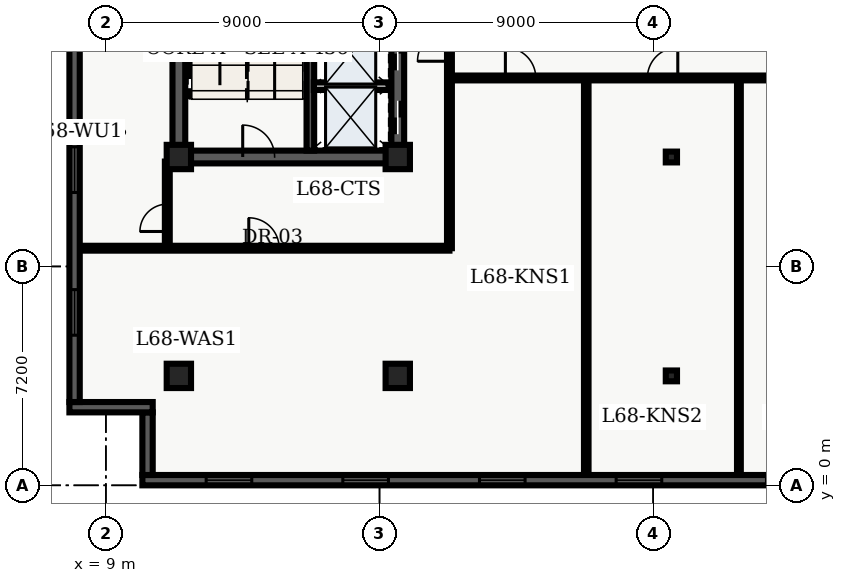
"""IFC4 building model, lengths in metres.
Left out: names, types, materials, properties, quantities, classifications, styles, units other than length and angle.
Written with IfcOpenShell. Run it as: python <this file> out.ifc"""

import sys

from ifc_helpers import new_model, entity, si_unit, converted_unit, direction, frame, origin_with_axes, origin_2d_with_axis, place, context, subcontext, project, spatial, polyline, rectangle, i_section, outline, extrude, element, fill, save


model = new_model("IFC4")
c1 = context("Model", 3, precision=1e-05, world=origin_with_axes(), true_north=direction((0.0, 1.0)))
c2 = subcontext(c1, "Body", "Model", "MODEL_VIEW")
j1 = project(units=[si_unit("LENGTHUNIT", "METRE"), converted_unit("PLANEANGLEUNIT", "DEGREE", entity("IfcPlaneAngleMeasure", 0.017), si_unit("PLANEANGLEUNIT", "RADIAN"), dimensions=[0, 0, 0, 0, 0, 0, 0])], contexts=[c1])
p1 = place(None, origin_with_axes())
s1 = spatial("IfcSite", under=j1, at=p1, CompositionType="ELEMENT")
p2 = place(p1, origin_with_axes())
s2 = spatial("IfcBuilding", under=s1, at=p2, CompositionType="ELEMENT")
p3 = place(p2, frame((0.0, 0.0, 276.3), z_axis=(0.0, 0.0, 1.0), x_axis=(1.0, 0.0, 0.0)))
s3 = spatial("IfcBuildingStorey", under=s2, at=p3, CompositionType="ELEMENT", Elevation=276.3)
p4 = place(p3, frame((11.4, 10.8, 0.0), z_axis=(0.0, 0.0, 1.0), x_axis=(0.0, 1.0, 0.0)))
e1 = element("IfcWall", 1, at=p4, inside=s3, PredefinedType="SHEAR", context=c2, shape_type="SweptSolid", body=[
    extrude(outline(polyline([(0.0, -0.21), (27.0, -0.21), (27.0, 0.21), (0.0, 0.21), (0.0, -0.21)])), origin_with_axes(), (0.0, 0.0, 1.0), 3.66),
])
p5 = place(p3, frame((11.4, 10.8, 0.0), z_axis=(0.0, 0.0, 1.0), x_axis=(1.0, 0.0, 0.0)))
e2 = element("IfcWall", 2, at=p5, inside=s3, PredefinedType="SHEAR", context=c2, shape_type="SweptSolid", body=[
    extrude(outline(polyline([(0.0, -0.21), (7.2, -0.21), (7.2, 0.21), (0.0, 0.21), (0.0, -0.21)])), origin_with_axes(), (0.0, 0.0, 1.0), 3.66),
])
p6 = place(p5, frame((2.625, 0.0, 0.0), z_axis=(0.0, 0.0, 1.0), x_axis=(1.0, 0.0, 0.0)))
e3 = element("IfcOpeningElement", 3, at=p6, cuts=e2, PredefinedType="OPENING", context=c2, shape_type="SweptSolid", body=[
    extrude(rectangle(XDim=1.05, YDim=0.44, at=origin_2d_with_axis()), origin_with_axes(), (0.0, 0.0, 1.0), 2.15),
])
p7 = place(p3, frame((18.6, 10.8, 0.0), z_axis=(0.0, 0.0, 1.0), x_axis=(0.0, 1.0, 0.0)))
e4 = element("IfcWall", 4, at=p7, inside=s3, PredefinedType="SHEAR", context=c2, shape_type="SweptSolid", body=[
    extrude(outline(polyline([(0.0, -0.21), (13.5, -0.21), (13.5, 0.21), (0.0, 0.21), (0.0, -0.21)])), origin_with_axes(), (0.0, 0.0, 1.0), 3.66),
])
p8 = place(p7, frame((1.3, 0.0, 0.0), z_axis=(0.0, 0.0, 1.0), x_axis=(1.0, 0.0, 0.0)))
e5 = element("IfcOpeningElement", 5, at=p8, cuts=e4, PredefinedType="OPENING", context=c2, shape_type="SweptSolid", body=[
    extrude(rectangle(XDim=1.1, YDim=0.44, at=origin_2d_with_axis()), origin_with_axes(), (0.0, 0.0, 1.0), 2.15),
])
p9 = place(p7, frame((3.4, 0.0, 0.0), z_axis=(0.0, 0.0, 1.0), x_axis=(1.0, 0.0, 0.0)))
e6 = element("IfcOpeningElement", 6, at=p9, cuts=e4, PredefinedType="OPENING", context=c2, shape_type="SweptSolid", body=[
    extrude(rectangle(XDim=1.1, YDim=0.44, at=origin_2d_with_axis()), origin_with_axes(), (0.0, 0.0, 1.0), 2.15),
])
p10 = place(p7, frame((11.125, 0.0, 0.0), z_axis=(0.0, 0.0, 1.0), x_axis=(1.0, 0.0, 0.0)))
e7 = element("IfcOpeningElement", 7, at=p10, cuts=e4, PredefinedType="OPENING", context=c2, shape_type="SweptSolid", body=[
    extrude(rectangle(XDim=1.05, YDim=0.44, at=origin_2d_with_axis()), origin_with_axes(), (0.0, 0.0, 1.0), 2.15),
])
p11 = place(p7, frame((6.675, 0.0, 0.0), z_axis=(0.0, 0.0, 1.0), x_axis=(1.0, 0.0, 0.0)))
e8 = element("IfcOpeningElement", 8, at=p11, cuts=e4, PredefinedType="OPENING", context=c2, shape_type="SweptSolid", body=[
    extrude(rectangle(XDim=0.95, YDim=0.44, at=origin_2d_with_axis()), origin_with_axes(), (0.0, 0.0, 1.0), 2.15),
])
p12 = place(p3, frame((15.725, 11.01, 0.0), z_axis=(0.0, 0.0, 1.0), x_axis=(0.0, 1.0, 0.0)))
e9 = element("IfcWall", 9, at=p12, inside=s3, PredefinedType="SHEAR", context=c2, shape_type="SweptSolid", body=[
    extrude(outline(polyline([(0.0, -0.125), (8.69, -0.125), (8.69, 0.125), (0.0, 0.125), (0.0, -0.125)])), origin_with_axes(), (0.0, 0.0, 1.0), 3.66),
])
for number, where, z_axis, x_axis in (
    (10, (11.4, 3.6, 0.0), (0.0, 0.0, 1.0), (1.0, 0.0, 0.0)),
    (11, (11.4, 10.8, 0.0), (0.0, 0.0, 1.0), (1.0, 0.0, 0.0)),
    (12, (18.6, 3.6, 0.0), (0.0, 0.0, 1.0), (1.0, 0.0, 0.0)),
    (13, (18.6, 10.8, 0.0), (0.0, 0.0, 1.0), (1.0, 0.0, 0.0)),
):
    element("IfcColumn", number, at=place(p3, frame(where, z_axis=z_axis, x_axis=x_axis)), inside=s3, PredefinedType="COLUMN", context=c2, shape_type="SweptSolid", body=[
        extrude(rectangle(XDim=0.8, YDim=0.8, at=origin_2d_with_axis()), origin_with_axes(), (0.0, 0.0, 1.0), 3.9),
    ])
for number, where, z_axis, x_axis in (
    (14, (27.6, 3.6, 0.0), (0.0, 0.0, 1.0), (1.0, 0.0, 0.0)),
    (15, (27.6, 10.8, 0.0), (0.0, 0.0, 1.0), (1.0, 0.0, 0.0)),
):
    element("IfcColumn", number, at=place(p3, frame(where, z_axis=z_axis, x_axis=x_axis)), inside=s3, PredefinedType="COLUMN", context=c2, shape_type="SweptSolid", body=[
        extrude(i_section(OverallWidth=0.369, OverallDepth=0.356, WebThickness=0.011, FlangeThickness=0.018, FilletRadius=0.018, at=origin_2d_with_axis()), origin_with_axes(), (0.0, 0.0, 1.0), 3.9),
    ])
p13 = place(p3, frame((15.84, 13.13, 0.0), z_axis=(0.0, 0.0, 1.0), x_axis=(1.0, 0.0, 0.0)))
e16 = element("IfcWall", 16, at=p13, inside=s3, PredefinedType="SOLIDWALL", context=c2, shape_type="SweptSolid", body=[
    extrude(outline(polyline([(0.0, -0.125), (2.46, -0.125), (2.46, 0.125), (0.0, 0.125), (0.0, -0.125)])), origin_with_axes(), (0.0, 0.0, 1.0), 2.7),
])
p14 = place(p3, frame((8.135, 7.8, 0.0), z_axis=(0.0, 0.0, 1.0), x_axis=(1.0, 0.0, 0.0)))
e17 = element("IfcWall", 17, at=p14, inside=s3, PredefinedType="PARTITIONING", context=c2, shape_type="SweptSolid", body=[
    extrude(outline(polyline([(0.0, -0.08), (12.165, -0.08), (12.165, 0.08), (0.0, 0.08), (0.0, -0.08)])), origin_with_axes(), (0.0, 0.0, 1.0), 2.7),
])
p15 = place(p14, frame((6.065, 0.0, 0.0), z_axis=(0.0, 0.0, 1.0), x_axis=(1.0, 0.0, 0.0)))
e18 = element("IfcOpeningElement", 18, at=p15, cuts=e17, PredefinedType="OPENING", context=c2, shape_type="SweptSolid", body=[
    extrude(rectangle(XDim=1.0, YDim=0.18, at=origin_2d_with_axis()), origin_with_axes(), (0.0, 0.0, 1.0), 2.15),
])
p16 = place(p3, frame((20.3, 7.8, 0.0), z_axis=(0.0, 0.0, 1.0), x_axis=(0.0, 1.0, 0.0)))
e19 = element("IfcWall", 19, at=p16, inside=s3, PredefinedType="PARTITIONING", context=c2, shape_type="SweptSolid", body=[
    extrude(outline(polyline([(0.0, -0.08), (32.7, -0.08), (32.7, 0.08), (0.0, 0.08), (0.0, -0.08)])), origin_with_axes(), (0.0, 0.0, 1.0), 2.7),
])
p17 = place(p16, frame((14.392, 0.0, 0.0), z_axis=(0.0, 0.0, 1.0), x_axis=(1.0, 0.0, 0.0)))
e20 = element("IfcOpeningElement", 20, at=p17, cuts=e19, PredefinedType="OPENING", context=c2, shape_type="SweptSolid", body=[
    extrude(rectangle(XDim=1.0, YDim=0.18, at=origin_2d_with_axis()), origin_with_axes(), (0.0, 0.0, 1.0), 2.15),
])
p18 = place(p16, frame((18.846, 0.0, 0.0), z_axis=(0.0, 0.0, 1.0), x_axis=(1.0, 0.0, 0.0)))
e21 = element("IfcOpeningElement", 21, at=p18, cuts=e19, PredefinedType="OPENING", context=c2, shape_type="SweptSolid", body=[
    extrude(rectangle(XDim=1.0, YDim=0.18, at=origin_2d_with_axis()), origin_with_axes(), (0.0, 0.0, 1.0), 2.15),
])
p19 = place(p16, frame((23.952, 0.0, 0.0), z_axis=(0.0, 0.0, 1.0), x_axis=(1.0, 0.0, 0.0)))
e22 = element("IfcOpeningElement", 22, at=p19, cuts=e19, PredefinedType="OPENING", context=c2, shape_type="SweptSolid", body=[
    extrude(rectangle(XDim=1.0, YDim=0.18, at=origin_2d_with_axis()), origin_with_axes(), (0.0, 0.0, 1.0), 2.15),
])
p20 = place(p16, frame((27.114, 0.0, 0.0), z_axis=(0.0, 0.0, 1.0), x_axis=(1.0, 0.0, 0.0)))
e23 = element("IfcOpeningElement", 23, at=p20, cuts=e19, PredefinedType="OPENING", context=c2, shape_type="SweptSolid", body=[
    extrude(rectangle(XDim=1.0, YDim=0.18, at=origin_2d_with_axis()), origin_with_axes(), (0.0, 0.0, 1.0), 2.15),
])
p21 = place(p16, frame((6.675, 0.0, 0.0), z_axis=(0.0, 0.0, 1.0), x_axis=(1.0, 0.0, 0.0)))
e24 = element("IfcOpeningElement", 24, at=p21, cuts=e19, PredefinedType="OPENING", context=c2, shape_type="SweptSolid", body=[
    extrude(rectangle(XDim=1.05, YDim=0.18, at=origin_2d_with_axis()), origin_with_axes(), (0.0, 0.0, 1.0), 2.15),
])
p22 = place(p3, frame((11.02, 7.8, 0.0), z_axis=(0.0, 0.0, 1.0), x_axis=(0.0, 1.0, 0.0)))
e25 = element("IfcWall", 25, at=p22, inside=s3, PredefinedType="PARTITIONING", context=c2, shape_type="SweptSolid", body=[
    extrude(outline(polyline([(0.0, -0.08), (2.85, -0.08), (2.85, 0.08), (0.0, 0.08), (0.0, -0.08)])), origin_with_axes(), (0.0, 0.0, 1.0), 2.7),
])
p23 = place(p22, frame((1.0, 0.0, 0.0), z_axis=(0.0, 0.0, 1.0), x_axis=(1.0, 0.0, 0.0)))
e26 = element("IfcOpeningElement", 26, at=p23, cuts=e25, PredefinedType="OPENING", context=c2, shape_type="SweptSolid", body=[
    extrude(rectangle(XDim=0.9, YDim=0.18, at=origin_2d_with_axis()), origin_with_axes(), (0.0, 0.0, 1.0), 2.15),
])
p24 = place(p3, frame((20.3, 13.4, 0.0), z_axis=(0.0, 0.0, 1.0), x_axis=(1.0, 0.0, 0.0)))
e27 = element("IfcWall", 27, at=p24, inside=s3, PredefinedType="PARTITIONING", context=c2, shape_type="SweptSolid", body=[
    extrude(outline(polyline([(0.0, -0.08), (15.45, -0.08), (15.45, 0.08), (0.0, 0.08), (0.0, -0.08)])), origin_with_axes(), (0.0, 0.0, 1.0), 2.7),
])
p25 = place(p24, frame((2.34, 0.0, 0.0), z_axis=(0.0, 0.0, 1.0), x_axis=(1.0, 0.0, 0.0)))
e28 = element("IfcOpeningElement", 28, at=p25, cuts=e27, PredefinedType="OPENING", context=c2, shape_type="SweptSolid", body=[
    extrude(rectangle(XDim=1.0, YDim=0.18, at=origin_2d_with_axis()), origin_with_axes(), (0.0, 0.0, 1.0), 2.15),
])
p26 = place(p24, frame((7.011, 0.0, 0.0), z_axis=(0.0, 0.0, 1.0), x_axis=(1.0, 0.0, 0.0)))
e29 = element("IfcOpeningElement", 29, at=p26, cuts=e27, PredefinedType="OPENING", context=c2, shape_type="SweptSolid", body=[
    extrude(rectangle(XDim=1.0, YDim=0.18, at=origin_2d_with_axis()), origin_with_axes(), (0.0, 0.0, 1.0), 2.15),
])
p27 = place(p24, frame((12.445, 0.0, 0.0), z_axis=(0.0, 0.0, 1.0), x_axis=(1.0, 0.0, 0.0)))
e30 = element("IfcOpeningElement", 30, at=p27, cuts=e27, PredefinedType="OPENING", context=c2, shape_type="SweptSolid", body=[
    extrude(rectangle(XDim=1.2, YDim=0.18, at=origin_2d_with_axis()), origin_with_axes(), (0.0, 0.0, 1.0), 2.2),
])
p28 = place(p3, frame((24.8, 0.335, 0.0), z_axis=(0.0, 0.0, 1.0), x_axis=(0.0, 1.0, 0.0)))
e31 = element("IfcWall", 31, at=p28, inside=s3, PredefinedType="PARTITIONING", context=c2, shape_type="SweptSolid", body=[
    extrude(outline(polyline([(0.0, -0.075), (12.945, -0.075), (12.945, 0.075), (0.0, 0.075), (0.0, -0.075)])), origin_with_axes(), (0.0, 0.0, 1.0), 2.7),
])
p29 = place(p3, frame((29.821, 0.335, 0.0), z_axis=(0.0, 0.0, 1.0), x_axis=(0.0, 1.0, 0.0)))
e32 = element("IfcWall", 32, at=p29, inside=s3, PredefinedType="PARTITIONING", context=c2, shape_type="SweptSolid", body=[
    extrude(outline(polyline([(0.0, -0.062), (12.945, -0.062), (12.945, 0.062), (0.0, 0.062), (0.0, -0.062)])), origin_with_axes(), (0.0, 0.0, 1.0), 2.7),
])
p30 = place(p3, frame((47.36, 0.17, 0.0), z_axis=(0.0, 0.0, 1.0), x_axis=(-1.0, 0.0, 0.0)))
e33 = element("IfcWall", 33, at=p30, inside=s3, PredefinedType="SOLIDWALL", context=c2, shape_type="SweptSolid", body=[
    extrude(outline(polyline([(0.0, -0.17), (37.16, -0.17), (37.16, 0.17), (0.0, 0.17), (0.0, -0.17)])), origin_with_axes(), (0.0, 0.0, 1.0), 3.66),
])
p31 = place(p30, frame((2.847, 0.0, 0.45), z_axis=(0.0, 0.0, 1.0), x_axis=(1.0, 0.0, 0.0)))
e34 = element("IfcOpeningElement", 34, at=p31, cuts=e33, PredefinedType="OPENING", context=c2, shape_type="SweptSolid", body=[
    extrude(rectangle(XDim=1.5, YDim=0.36, at=origin_2d_with_axis()), origin_with_axes(), (0.0, 0.0, 1.0), 2.1),
])
p32 = place(p30, frame((7.342, 0.0, 0.45), z_axis=(0.0, 0.0, 1.0), x_axis=(1.0, 0.0, 0.0)))
e35 = element("IfcOpeningElement", 35, at=p32, cuts=e33, PredefinedType="OPENING", context=c2, shape_type="SweptSolid", body=[
    extrude(rectangle(XDim=1.5, YDim=0.36, at=origin_2d_with_axis()), origin_with_axes(), (0.0, 0.0, 1.0), 2.1),
])
p33 = place(p30, frame((11.837, 0.0, 0.45), z_axis=(0.0, 0.0, 1.0), x_axis=(1.0, 0.0, 0.0)))
e36 = element("IfcOpeningElement", 36, at=p33, cuts=e33, PredefinedType="OPENING", context=c2, shape_type="SweptSolid", body=[
    extrude(rectangle(XDim=1.5, YDim=0.36, at=origin_2d_with_axis()), origin_with_axes(), (0.0, 0.0, 1.0), 2.1),
])
p34 = place(p30, frame((15.882, 0.0, 0.45), z_axis=(0.0, 0.0, 1.0), x_axis=(1.0, 0.0, 0.0)))
e37 = element("IfcOpeningElement", 37, at=p34, cuts=e33, PredefinedType="OPENING", context=c2, shape_type="SweptSolid", body=[
    extrude(rectangle(XDim=1.5, YDim=0.36, at=origin_2d_with_axis()), origin_with_axes(), (0.0, 0.0, 1.0), 2.1),
])
p35 = place(p30, frame((20.827, 0.0, 0.45), z_axis=(0.0, 0.0, 1.0), x_axis=(1.0, 0.0, 0.0)))
e38 = element("IfcOpeningElement", 38, at=p35, cuts=e33, PredefinedType="OPENING", context=c2, shape_type="SweptSolid", body=[
    extrude(rectangle(XDim=1.5, YDim=0.36, at=origin_2d_with_axis()), origin_with_axes(), (0.0, 0.0, 1.0), 2.1),
])
p36 = place(p30, frame((25.322, 0.0, 0.45), z_axis=(0.0, 0.0, 1.0), x_axis=(1.0, 0.0, 0.0)))
e39 = element("IfcOpeningElement", 39, at=p36, cuts=e33, PredefinedType="OPENING", context=c2, shape_type="SweptSolid", body=[
    extrude(rectangle(XDim=1.5, YDim=0.36, at=origin_2d_with_axis()), origin_with_axes(), (0.0, 0.0, 1.0), 2.1),
])
p37 = place(p30, frame((29.817, 0.0, 0.45), z_axis=(0.0, 0.0, 1.0), x_axis=(1.0, 0.0, 0.0)))
e40 = element("IfcOpeningElement", 40, at=p37, cuts=e33, PredefinedType="OPENING", context=c2, shape_type="SweptSolid", body=[
    extrude(rectangle(XDim=1.5, YDim=0.36, at=origin_2d_with_axis()), origin_with_axes(), (0.0, 0.0, 1.0), 2.1),
])
p38 = place(p30, frame((34.312, 0.0, 0.45), z_axis=(0.0, 0.0, 1.0), x_axis=(1.0, 0.0, 0.0)))
e41 = element("IfcOpeningElement", 41, at=p38, cuts=e33, PredefinedType="OPENING", context=c2, shape_type="SweptSolid", body=[
    extrude(rectangle(XDim=1.5, YDim=0.36, at=origin_2d_with_axis()), origin_with_axes(), (0.0, 0.0, 1.0), 2.1),
])
p39 = place(p3, frame((10.37, 0.34, 0.0), z_axis=(0.0, 0.0, 1.0), x_axis=(0.0, 1.0, 0.0)))
e42 = element("IfcWall", 42, at=p39, inside=s3, PredefinedType="SOLIDWALL", context=c2, shape_type="SweptSolid", body=[
    extrude(outline(polyline([(0.0, -0.17), (2.06, -0.17), (2.06, 0.17), (0.0, 0.17), (0.0, -0.17)])), origin_with_axes(), (0.0, 0.0, 1.0), 3.66),
])
p40 = place(p3, frame((10.54, 2.57, 0.0), z_axis=(0.0, 0.0, 1.0), x_axis=(-1.0, 0.0, 0.0)))
e43 = element("IfcWall", 43, at=p40, inside=s3, PredefinedType="SOLIDWALL", context=c2, shape_type="SweptSolid", body=[
    extrude(outline(polyline([(0.0, -0.17), (2.74, -0.17), (2.74, 0.17), (0.0, 0.17), (0.0, -0.17)])), origin_with_axes(), (0.0, 0.0, 1.0), 3.66),
])
p41 = place(p3, frame((7.97, 2.74, 0.0), z_axis=(0.0, 0.0, 1.0), x_axis=(0.0, 1.0, 0.0)))
e44 = element("IfcWall", 44, at=p41, inside=s3, PredefinedType="SOLIDWALL", context=c2, shape_type="SweptSolid", body=[
    extrude(outline(polyline([(0.0, -0.17), (43.46, -0.17), (43.46, 0.17), (0.0, 0.17), (0.0, -0.17)])), origin_with_axes(), (0.0, 0.0, 1.0), 3.66),
])
p42 = place(p41, frame((2.948, 0.0, 0.45), z_axis=(0.0, 0.0, 1.0), x_axis=(1.0, 0.0, 0.0)))
e45 = element("IfcOpeningElement", 45, at=p42, cuts=e44, PredefinedType="OPENING", context=c2, shape_type="SweptSolid", body=[
    extrude(rectangle(XDim=1.5, YDim=0.36, at=origin_2d_with_axis()), origin_with_axes(), (0.0, 0.0, 1.0), 2.1),
])
p43 = place(p41, frame((7.643, 0.0, 0.45), z_axis=(0.0, 0.0, 1.0), x_axis=(1.0, 0.0, 0.0)))
e46 = element("IfcOpeningElement", 46, at=p43, cuts=e44, PredefinedType="OPENING", context=c2, shape_type="SweptSolid", body=[
    extrude(rectangle(XDim=1.5, YDim=0.36, at=origin_2d_with_axis()), origin_with_axes(), (0.0, 0.0, 1.0), 2.1),
])
p44 = place(p41, frame((17.034, 0.0, 0.45), z_axis=(0.0, 0.0, 1.0), x_axis=(1.0, 0.0, 0.0)))
e47 = element("IfcOpeningElement", 47, at=p44, cuts=e44, PredefinedType="OPENING", context=c2, shape_type="SweptSolid", body=[
    extrude(rectangle(XDim=1.5, YDim=0.36, at=origin_2d_with_axis()), origin_with_axes(), (0.0, 0.0, 1.0), 2.1),
])
p45 = place(p41, frame((26.426, 0.0, 0.45), z_axis=(0.0, 0.0, 1.0), x_axis=(1.0, 0.0, 0.0)))
e48 = element("IfcOpeningElement", 48, at=p45, cuts=e44, PredefinedType="OPENING", context=c2, shape_type="SweptSolid", body=[
    extrude(rectangle(XDim=1.5, YDim=0.36, at=origin_2d_with_axis()), origin_with_axes(), (0.0, 0.0, 1.0), 2.1),
])
p46 = place(p41, frame((31.571, 0.0, 0.45), z_axis=(0.0, 0.0, 1.0), x_axis=(1.0, 0.0, 0.0)))
e49 = element("IfcOpeningElement", 49, at=p46, cuts=e44, PredefinedType="OPENING", context=c2, shape_type="SweptSolid", body=[
    extrude(rectangle(XDim=1.5, YDim=0.36, at=origin_2d_with_axis()), origin_with_axes(), (0.0, 0.0, 1.0), 2.1),
])
p47 = place(p41, frame((35.817, 0.0, 0.45), z_axis=(0.0, 0.0, 1.0), x_axis=(1.0, 0.0, 0.0)))
e50 = element("IfcOpeningElement", 50, at=p47, cuts=e44, PredefinedType="OPENING", context=c2, shape_type="SweptSolid", body=[
    extrude(rectangle(XDim=1.5, YDim=0.36, at=origin_2d_with_axis()), origin_with_axes(), (0.0, 0.0, 1.0), 2.1),
])
p48 = place(p41, frame((40.512, 0.0, 0.45), z_axis=(0.0, 0.0, 1.0), x_axis=(1.0, 0.0, 0.0)))
e51 = element("IfcOpeningElement", 51, at=p48, cuts=e44, PredefinedType="OPENING", context=c2, shape_type="SweptSolid", body=[
    extrude(rectangle(XDim=1.5, YDim=0.36, at=origin_2d_with_axis()), origin_with_axes(), (0.0, 0.0, 1.0), 2.1),
])
p49 = place(p7, frame((1.3, 0.0, 0.0), z_axis=(0.0, 0.0, 1.0), x_axis=(1.0, 0.0, 0.0)))
e52 = element("IfcDoor", 52, at=p49, inside=s3, OperationType="SLIDING_TO_LEFT", PredefinedType="DOOR", context=c2, shape_type="SweptSolid", body=[
    extrude(rectangle(XDim=1.1, YDim=0.09, at=origin_2d_with_axis()), origin_with_axes(), (0.0, 0.0, 1.0), 2.15),
])
fill(e5, e52)
p50 = place(p7, frame((3.4, 0.0, 0.0), z_axis=(0.0, 0.0, 1.0), x_axis=(1.0, 0.0, 0.0)))
e53 = element("IfcDoor", 53, at=p50, inside=s3, OperationType="SLIDING_TO_RIGHT", PredefinedType="DOOR", context=c2, shape_type="SweptSolid", body=[
    extrude(rectangle(XDim=1.1, YDim=0.09, at=origin_2d_with_axis()), origin_with_axes(), (0.0, 0.0, 1.0), 2.15),
])
fill(e6, e53)
p51 = place(p5, frame((2.625, 0.0, 0.0), z_axis=(0.0, 0.0, 1.0), x_axis=(1.0, 0.0, 0.0)))
e54 = element("IfcDoor", 54, at=p51, inside=s3, OperationType="SINGLE_SWING_LEFT", PredefinedType="DOOR", context=c2, shape_type="SweptSolid", body=[
    extrude(rectangle(XDim=1.05, YDim=0.09, at=origin_2d_with_axis()), origin_with_axes(), (0.0, 0.0, 1.0), 2.15),
])
fill(e3, e54)
p52 = place(p22, frame((1.0, 0.0, 0.0), z_axis=(0.0, 0.0, 1.0), x_axis=(1.0, 0.0, 0.0)))
e55 = element("IfcDoor", 55, at=p52, inside=s3, OperationType="SINGLE_SWING_LEFT", PredefinedType="DOOR", context=c2, shape_type="SweptSolid", body=[
    extrude(rectangle(XDim=0.9, YDim=0.09, at=origin_2d_with_axis()), origin_with_axes(), (0.0, 0.0, 1.0), 2.15),
])
fill(e26, e55)
p53 = place(p14, frame((6.065, 0.0, 0.0), z_axis=(0.0, 0.0, 1.0), x_axis=(1.0, 0.0, 0.0)))
e56 = element("IfcDoor", 56, at=p53, inside=s3, OperationType="SINGLE_SWING_LEFT", PredefinedType="DOOR", context=c2, shape_type="SweptSolid", body=[
    extrude(rectangle(XDim=1.0, YDim=0.09, at=origin_2d_with_axis()), origin_with_axes(), (0.0, 0.0, 1.0), 2.15),
])
fill(e18, e56)
p54 = place(p16, frame((6.675, 0.0, 0.0), z_axis=(0.0, 0.0, 1.0), x_axis=(1.0, 0.0, 0.0)))
e57 = element("IfcDoor", 57, at=p54, inside=s3, OperationType="SINGLE_SWING_LEFT", PredefinedType="DOOR", context=c2, shape_type="SweptSolid", body=[
    extrude(rectangle(XDim=1.05, YDim=0.09, at=origin_2d_with_axis()), origin_with_axes(), (0.0, 0.0, 1.0), 2.15),
])
fill(e24, e57)
p55 = place(p24, frame((2.34, 0.0, 0.0), z_axis=(0.0, 0.0, 1.0), x_axis=(1.0, 0.0, 0.0)))
e58 = element("IfcDoor", 58, at=p55, inside=s3, OperationType="SINGLE_SWING_LEFT", PredefinedType="DOOR", context=c2, shape_type="SweptSolid", body=[
    extrude(rectangle(XDim=1.0, YDim=0.09, at=origin_2d_with_axis()), origin_with_axes(), (0.0, 0.0, 1.0), 2.15),
])
fill(e28, e58)
p56 = place(p24, frame((7.011, 0.0, 0.0), z_axis=(0.0, 0.0, 1.0), x_axis=(1.0, 0.0, 0.0)))
e59 = element("IfcDoor", 59, at=p56, inside=s3, OperationType="SINGLE_SWING_RIGHT", PredefinedType="DOOR", context=c2, shape_type="SweptSolid", body=[
    extrude(rectangle(XDim=1.0, YDim=0.09, at=origin_2d_with_axis()), origin_with_axes(), (0.0, 0.0, 1.0), 2.15),
])
fill(e29, e59)
p57 = place(p30, frame((15.882, 0.0, 0.45), z_axis=(0.0, 0.0, 1.0), x_axis=(1.0, 0.0, 0.0)))
e60 = element("IfcWindow", 60, at=p57, inside=s3, PredefinedType="WINDOW", context=c2, shape_type="SweptSolid", body=[
    extrude(rectangle(XDim=1.5, YDim=0.09, at=origin_2d_with_axis()), origin_with_axes(), (0.0, 0.0, 1.0), 2.1),
])
fill(e37, e60)
p58 = place(p30, frame((20.827, 0.0, 0.45), z_axis=(0.0, 0.0, 1.0), x_axis=(1.0, 0.0, 0.0)))
e61 = element("IfcWindow", 61, at=p58, inside=s3, PredefinedType="WINDOW", context=c2, shape_type="SweptSolid", body=[
    extrude(rectangle(XDim=1.5, YDim=0.09, at=origin_2d_with_axis()), origin_with_axes(), (0.0, 0.0, 1.0), 2.1),
])
fill(e38, e61)
p59 = place(p30, frame((25.322, 0.0, 0.45), z_axis=(0.0, 0.0, 1.0), x_axis=(1.0, 0.0, 0.0)))
e62 = element("IfcWindow", 62, at=p59, inside=s3, PredefinedType="WINDOW", context=c2, shape_type="SweptSolid", body=[
    extrude(rectangle(XDim=1.5, YDim=0.09, at=origin_2d_with_axis()), origin_with_axes(), (0.0, 0.0, 1.0), 2.1),
])
fill(e39, e62)
p60 = place(p30, frame((29.817, 0.0, 0.45), z_axis=(0.0, 0.0, 1.0), x_axis=(1.0, 0.0, 0.0)))
e63 = element("IfcWindow", 63, at=p60, inside=s3, PredefinedType="WINDOW", context=c2, shape_type="SweptSolid", body=[
    extrude(rectangle(XDim=1.5, YDim=0.09, at=origin_2d_with_axis()), origin_with_axes(), (0.0, 0.0, 1.0), 2.1),
])
fill(e40, e63)
p61 = place(p30, frame((34.312, 0.0, 0.45), z_axis=(0.0, 0.0, 1.0), x_axis=(1.0, 0.0, 0.0)))
e64 = element("IfcWindow", 64, at=p61, inside=s3, PredefinedType="WINDOW", context=c2, shape_type="SweptSolid", body=[
    extrude(rectangle(XDim=1.5, YDim=0.09, at=origin_2d_with_axis()), origin_with_axes(), (0.0, 0.0, 1.0), 2.1),
])
fill(e41, e64)
p62 = place(p41, frame((2.948, 0.0, 0.45), z_axis=(0.0, 0.0, 1.0), x_axis=(1.0, 0.0, 0.0)))
e65 = element("IfcWindow", 65, at=p62, inside=s3, PredefinedType="WINDOW", context=c2, shape_type="SweptSolid", body=[
    extrude(rectangle(XDim=1.5, YDim=0.09, at=origin_2d_with_axis()), origin_with_axes(), (0.0, 0.0, 1.0), 2.1),
])
fill(e45, e65)
p63 = place(p41, frame((7.643, 0.0, 0.45), z_axis=(0.0, 0.0, 1.0), x_axis=(1.0, 0.0, 0.0)))
e66 = element("IfcWindow", 66, at=p63, inside=s3, PredefinedType="WINDOW", context=c2, shape_type="SweptSolid", body=[
    extrude(rectangle(XDim=1.5, YDim=0.09, at=origin_2d_with_axis()), origin_with_axes(), (0.0, 0.0, 1.0), 2.1),
])
fill(e46, e66)
save(model, sys.argv[1])
